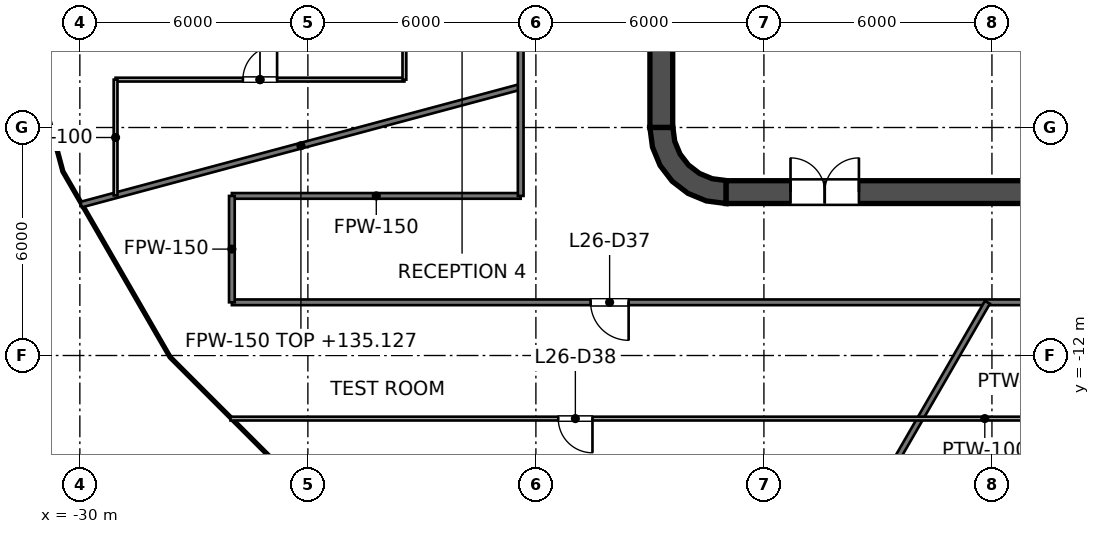
"""IFC4 building model, lengths in metres.
Left out: names, types, materials, properties, quantities, classifications, styles, units other than length and angle.
Written with IfcOpenShell. Run it as: python <this file> out.ifc"""

import sys

from ifc_helpers import new_model, si_unit, direction, frame, frame_2d, origin, place, context, subcontext, project, spatial, polyline, rectangle, outline, extrude, element, fill, save


model = new_model("IFC4")
c1 = context("Model", 3, precision=1e-05, world=origin(), true_north=direction((0.0, 1.0)))
c2 = subcontext(c1, "Body", "Model", "MODEL_VIEW")
j1 = project(units=[si_unit("LENGTHUNIT", "METRE"), si_unit("PLANEANGLEUNIT", "RADIAN")], contexts=[c1])
p1 = place(None, origin())
s1 = spatial("IfcSite", under=j1, at=p1, CompositionType="ELEMENT")
p2 = place(p1, origin())
s2 = spatial("IfcBuilding", under=s1, at=p2, CompositionType="ELEMENT")
p3 = place(p2, frame((0.0, 0.0, 131.4)))
s3 = spatial("IfcBuildingStorey", under=s2, at=p3, CompositionType="ELEMENT", Elevation=131.4)
p4 = place(p3, frame((-13.0, -7.7, 0.0), z_axis=(0.0, 0.0, 1.0), x_axis=(1.0, 0.0, 0.0)))
e1 = element("IfcWall", 1, at=p4, inside=s3, PredefinedType="SHEAR", context=c2, shape_type="SweptSolid", body=[
    extrude(rectangle(XDim=26.0, YDim=0.6, at=frame_2d((13.0, 0.0))), origin(), (0.0, 0.0, 1.0), 4.2),
])
p5 = place(p4, frame((1.7, 0.0, 0.0)))
e2 = element("IfcOpeningElement", 2, at=p5, cuts=e1, PredefinedType="OPENING", context=c2, shape_type="SweptSolid", body=[
    extrude(rectangle(XDim=1.8, YDim=2.1, at=frame_2d((0.9, 1.05))), frame((0.0, 0.3, 0.0), z_axis=(0.0, -1.0, 0.0), x_axis=(1.0, 0.0, 0.0)), (0.0, 0.0, 1.0), 0.6),
])
p6 = place(p4, frame((22.5, 0.0, 0.0)))
e3 = element("IfcOpeningElement", 3, at=p6, cuts=e1, PredefinedType="OPENING", context=c2, shape_type="SweptSolid", body=[
    extrude(rectangle(XDim=1.8, YDim=2.1, at=frame_2d((0.9, 1.05))), frame((0.0, 0.3, 0.0), z_axis=(0.0, -1.0, 0.0), x_axis=(1.0, 0.0, 0.0)), (0.0, 0.0, 1.0), 0.6),
])
p7 = place(p3, frame((-14.7, -6.0, 0.0), z_axis=(0.0, 0.0, 1.0), x_axis=(0.0, 1.0, 0.0)))
e4 = element("IfcWall", 4, at=p7, inside=s3, PredefinedType="SHEAR", context=c2, shape_type="SweptSolid", body=[
    extrude(rectangle(XDim=12.0, YDim=0.6, at=frame_2d((6.0, 0.0))), origin(), (0.0, 0.0, 1.0), 4.2),
])
p8 = place(p3, origin())
e5 = element("IfcWall", 5, at=p8, inside=s3, PredefinedType="SHEAR", context=c2, shape_type="SweptSolid", body=[
    extrude(outline(polyline([(-13.0, -8.0), (-13.0, -7.395), (-13.361, -7.347), (-13.698, -7.208), (-13.986, -6.986), (-14.208, -6.698), (-14.347, -6.361), (-14.395, -6.0), (-15.0, -6.0), (-14.932, -6.518), (-14.732, -7.0), (-14.414, -7.414), (-14.0, -7.732), (-13.518, -7.932), (-13.0, -8.0)])), origin(), (0.0, 0.0, 1.0), 4.2),
])
p9 = place(p3, frame((-9.0, -6.6, 0.0), z_axis=(0.0, 0.0, 1.0), x_axis=(0.0, 1.0, 0.0)))
e6 = element("IfcWall", 6, at=p9, inside=s3, PredefinedType="PARTITIONING", context=c2, shape_type="SweptSolid", body=[
    extrude(rectangle(XDim=2.5, YDim=0.25, at=frame_2d((1.25, 0.0))), origin(), (0.0, 0.0, 1.0), 4.05),
])
p10 = place(p9, frame((0.75, 0.0, 0.0)))
e7 = element("IfcOpeningElement", 7, at=p10, cuts=e6, PredefinedType="OPENING", context=c2, shape_type="SweptSolid", body=[
    extrude(rectangle(XDim=1.0, YDim=2.1, at=frame_2d((0.5, 1.05))), frame((0.0, 0.125, 0.0), z_axis=(0.0, -1.0, 0.0), x_axis=(1.0, 0.0, 0.0)), (0.0, 0.0, 1.0), 0.25),
])
p11 = place(p3, frame((-9.125, -7.0, 0.0), z_axis=(0.0, 0.0, 1.0), x_axis=(1.0, 0.0, 0.0)))
e8 = element("IfcWall", 8, at=p11, inside=s3, PredefinedType="SOLIDWALL", context=c2, shape_type="SweptSolid", body=[
    extrude(rectangle(XDim=18.25, YDim=0.8, at=frame_2d((9.125, 0.0))), origin(), (0.0, 0.0, 1.0), 4.05),
])
p12 = place(p3, frame((-9.125, -3.975, 0.0), z_axis=(0.0, 0.0, 1.0), x_axis=(1.0, 0.0, 0.0)))
e9 = element("IfcWall", 9, at=p12, inside=s3, PredefinedType="SOLIDWALL", context=c2, shape_type="SweptSolid", body=[
    extrude(rectangle(XDim=12.4, YDim=0.25, at=frame_2d((6.2, 0.0))), origin(), (0.0, 0.0, 1.0), 4.05),
])
p13 = place(p12, frame((1.05, 0.0, 0.0)))
e10 = element("IfcOpeningElement", 10, at=p13, cuts=e9, PredefinedType="OPENING", context=c2, shape_type="SweptSolid", body=[
    extrude(rectangle(XDim=1.2, YDim=2.1, at=frame_2d((0.6, 1.05))), frame((0.0, 0.125, 0.0), z_axis=(0.0, -1.0, 0.0), x_axis=(1.0, 0.0, 0.0)), (0.0, 0.0, 1.0), 0.25),
])
p14 = place(p12, frame((4.1, 0.0, 0.0)))
e11 = element("IfcOpeningElement", 11, at=p14, cuts=e9, PredefinedType="OPENING", context=c2, shape_type="SweptSolid", body=[
    extrude(rectangle(XDim=1.2, YDim=2.1, at=frame_2d((0.6, 1.05))), frame((0.0, 0.125, 0.0), z_axis=(0.0, -1.0, 0.0), x_axis=(1.0, 0.0, 0.0)), (0.0, 0.0, 1.0), 0.25),
])
p15 = place(p3, frame((-11.8, -7.4, 0.0), z_axis=(0.0, 0.0, 1.0), x_axis=(0.0, 1.0, 0.0)))
e12 = element("IfcWall", 12, at=p15, inside=s3, PredefinedType="SOLIDWALL", context=c2, shape_type="SweptSolid", body=[
    extrude(rectangle(XDim=14.8, YDim=0.4, at=frame_2d((7.4, 0.0))), origin(), (0.0, 0.0, 1.0), 4.05),
])
p16 = place(p15, frame((11.2, 0.0, 0.0)))
e13 = element("IfcOpeningElement", 13, at=p16, cuts=e12, PredefinedType="OPENING", context=c2, shape_type="SweptSolid", body=[
    extrude(rectangle(XDim=1.1, YDim=2.1, at=frame_2d((0.55, 1.05))), frame((0.0, 0.2, 0.0), z_axis=(0.0, -1.0, 0.0), x_axis=(1.0, 0.0, 0.0)), (0.0, 0.0, 1.0), 0.4),
])
p17 = place(p15, frame((8.3, 0.0, 0.0)))
e14 = element("IfcOpeningElement", 14, at=p17, cuts=e12, PredefinedType="OPENING", context=c2, shape_type="SweptSolid", body=[
    extrude(rectangle(XDim=1.1, YDim=2.1, at=frame_2d((0.55, 1.05))), frame((0.0, 0.2, 0.0), z_axis=(0.0, -1.0, 0.0), x_axis=(1.0, 0.0, 0.0)), (0.0, 0.0, 1.0), 0.4),
])
p18 = place(p15, frame((5.4, 0.0, 0.0)))
e15 = element("IfcOpeningElement", 15, at=p18, cuts=e12, PredefinedType="OPENING", context=c2, shape_type="SweptSolid", body=[
    extrude(rectangle(XDim=1.1, YDim=2.1, at=frame_2d((0.55, 1.05))), frame((0.0, 0.2, 0.0), z_axis=(0.0, -1.0, 0.0), x_axis=(1.0, 0.0, 0.0)), (0.0, 0.0, 1.0), 0.4),
])
p19 = place(p15, frame((13.552, 0.0, 0.0)))
e16 = element("IfcOpeningElement", 16, at=p19, cuts=e12, PredefinedType="OPENING", context=c2, shape_type="SweptSolid", body=[
    extrude(rectangle(XDim=0.9, YDim=2.1, at=frame_2d((0.45, 1.05))), frame((0.0, 0.2, 0.0), z_axis=(0.0, -1.0, 0.0), x_axis=(1.0, 0.0, 0.0)), (0.0, 0.0, 1.0), 0.4),
])
p20 = place(p15, frame((0.347, 0.0, 0.0)))
e17 = element("IfcOpeningElement", 17, at=p20, cuts=e12, PredefinedType="OPENING", context=c2, shape_type="SweptSolid", body=[
    extrude(rectangle(XDim=0.9, YDim=2.1, at=frame_2d((0.45, 1.05))), frame((0.0, 0.2, 0.0), z_axis=(0.0, -1.0, 0.0), x_axis=(1.0, 0.0, 0.0)), (0.0, 0.0, 1.0), 0.4),
])
e18 = element("IfcWall", 18, at=p8, inside=s3, PredefinedType="SOLIDWALL", context=c2, shape_type="SweptSolid", body=[
    extrude(outline(polyline([(-12.0, -5.925), (-12.0, -5.675), (-14.15, -5.675), (-14.15, -3.025), (-12.0, -3.025), (-12.0, -2.775), (-14.15, -2.775), (-14.15, -0.125), (-12.0, -0.125), (-12.0, 0.125), (-14.15, 0.125), (-14.15, 2.775), (-12.0, 2.775), (-12.0, 3.025), (-14.15, 3.025), (-14.15, 5.675), (-12.0, 5.675), (-12.0, 5.925), (-14.15, 5.925), (-14.4, 5.925), (-14.4, 5.675), (-14.4, 3.025), (-14.4, 2.775), (-14.4, 0.125), (-14.4, -0.125), (-14.4, -2.775), (-14.4, -3.025), (-14.4, -5.675), (-14.4, -5.925), (-14.15, -5.925), (-12.0, -5.925)])), origin(), (0.0, 0.0, 1.0), 4.05),
])
p21 = place(p3, frame((-26.0, -10.6, 0.0), z_axis=(0.0, 0.0, 1.0), x_axis=(1.0, 0.0, 0.0)))
e19 = element("IfcWall", 19, at=p21, inside=s3, PredefinedType="PARTITIONING", context=c2, shape_type="SweptSolid", body=[
    extrude(rectangle(XDim=52.0, YDim=0.15, at=frame_2d((26.0, 0.0))), origin(), (0.0, 0.0, 1.0), 3.127),
])
p22 = place(p21, frame((22.49, 0.0, 0.0)))
e20 = element("IfcOpeningElement", 20, at=p22, cuts=e19, PredefinedType="OPENING", context=c2, shape_type="SweptSolid", body=[
    extrude(rectangle(XDim=1.0, YDim=2.1, at=frame_2d((0.5, 1.05))), frame((0.0, 0.075, 0.0), z_axis=(0.0, -1.0, 0.0), x_axis=(1.0, 0.0, 0.0)), (0.0, 0.0, 1.0), 0.15),
])
p23 = place(p21, frame((30.8, 0.0, 0.0)))
e21 = element("IfcOpeningElement", 21, at=p23, cuts=e19, PredefinedType="OPENING", context=c2, shape_type="SweptSolid", body=[
    extrude(rectangle(XDim=1.0, YDim=2.1, at=frame_2d((0.5, 1.05))), frame((0.0, 0.075, 0.0), z_axis=(0.0, -1.0, 0.0), x_axis=(1.0, 0.0, 0.0)), (0.0, 0.0, 1.0), 0.15),
])
p24 = place(p21, frame((43.75, 0.0, 0.0)))
e22 = element("IfcOpeningElement", 22, at=p24, cuts=e19, PredefinedType="OPENING", context=c2, shape_type="SweptSolid", body=[
    extrude(rectangle(XDim=1.2, YDim=2.1, at=frame_2d((0.6, 1.05))), frame((0.0, 0.075, 0.0), z_axis=(0.0, -1.0, 0.0), x_axis=(1.0, 0.0, 0.0)), (0.0, 0.0, 1.0), 0.15),
])
p25 = place(p21, frame((9.44, 0.0, 0.0)))
e23 = element("IfcOpeningElement", 23, at=p25, cuts=e19, PredefinedType="OPENING", context=c2, shape_type="SweptSolid", body=[
    extrude(rectangle(XDim=1.0, YDim=2.1, at=frame_2d((0.5, 1.05))), frame((0.0, 0.075, 0.0), z_axis=(0.0, -1.0, 0.0), x_axis=(1.0, 0.0, 0.0)), (0.0, 0.0, 1.0), 0.15),
])
p26 = place(p3, frame((-26.0, -7.8, 0.0), z_axis=(0.0, 0.0, 1.0), x_axis=(1.0, 0.0, 0.0)))
e24 = element("IfcWall", 24, at=p26, inside=s3, PredefinedType="PARTITIONING", context=c2, shape_type="SweptSolid", body=[
    extrude(rectangle(XDim=7.6, YDim=0.15, at=frame_2d((3.8, 0.0))), origin(), (0.0, 0.0, 1.0), 3.276),
])
p27 = place(p3, frame((-29.966, -8.029, 0.0), z_axis=(0.0, 0.0, 1.0), x_axis=(0.965898076595, 0.258922586171, 0.0)))
e25 = element("IfcWall", 25, at=p27, inside=s3, PredefinedType="PARTITIONING", context=c2, shape_type="SweptSolid", body=[
    extrude(rectangle(XDim=11.974, YDim=0.15, at=frame_2d((5.987, 0.0))), origin(), (0.0, 0.0, 1.0), 3.727),
])
p28 = place(p3, frame((-12.65, -21.91, 0.0), z_axis=(0.0, 0.0, 1.0), x_axis=(0.500017508733, 0.866015294877, 0.0)))
e26 = element("IfcWall", 26, at=p28, inside=s3, PredefinedType="PARTITIONING", context=c2, shape_type="SweptSolid", body=[
    extrude(rectangle(XDim=13.06, YDim=0.15, at=frame_2d((6.53, 0.0))), origin(), (0.0, 0.0, 1.0), 3.502),
])
p29 = place(p3, frame((-18.4, -7.8, 0.0), z_axis=(0.0, 0.0, 1.0), x_axis=(0.0, 1.0, 0.0)))
e27 = element("IfcWall", 27, at=p29, inside=s3, PredefinedType="PARTITIONING", context=c2, shape_type="SweptSolid", body=[
    extrude(rectangle(XDim=15.6, YDim=0.15, at=frame_2d((7.8, 0.0))), origin(), (0.0, 0.0, 1.0), 3.127),
])
p30 = place(p29, frame((5.474, 0.0, 0.0)))
e28 = element("IfcOpeningElement", 28, at=p30, cuts=e27, PredefinedType="OPENING", context=c2, shape_type="SweptSolid", body=[
    extrude(rectangle(XDim=1.0, YDim=2.1, at=frame_2d((0.5, 1.05))), frame((0.0, 0.075, 0.0), z_axis=(0.0, -1.0, 0.0), x_axis=(1.0, 0.0, 0.0)), (0.0, 0.0, 1.0), 0.15),
])
p31 = place(p3, frame((-26.0, -10.6, 0.0), z_axis=(0.0, 0.0, 1.0), x_axis=(0.0, 1.0, 0.0)))
e29 = element("IfcWall", 29, at=p31, inside=s3, PredefinedType="PARTITIONING", context=c2, shape_type="SweptSolid", body=[
    extrude(rectangle(XDim=2.8, YDim=0.15, at=frame_2d((1.4, 0.0))), origin(), (0.0, 0.0, 1.0), 3.276),
])
p32 = place(p3, frame((-26.036, -13.66, 0.0), z_axis=(0.0, 0.0, 1.0), x_axis=(1.0, 0.0, 0.0)))
e30 = element("IfcWall", 30, at=p32, inside=s3, PredefinedType="PARTITIONING", context=c2, shape_type="SweptSolid", body=[
    extrude(rectangle(XDim=39.696, YDim=0.1, at=frame_2d((19.848, 0.0))), origin(), (0.0, 0.0, 1.0), 3.127),
])
p33 = place(p32, frame((31.966, 0.0, 0.0)))
e31 = element("IfcOpeningElement", 31, at=p33, cuts=e30, PredefinedType="OPENING", context=c2, shape_type="SweptSolid", body=[
    extrude(rectangle(XDim=1.8, YDim=2.1, at=frame_2d((0.9, 1.05))), frame((0.0, 0.05, 0.0), z_axis=(0.0, -1.0, 0.0), x_axis=(1.0, 0.0, 0.0)), (0.0, 0.0, 1.0), 0.1),
])
p34 = place(p32, frame((8.625, 0.0, 0.0)))
e32 = element("IfcOpeningElement", 32, at=p34, cuts=e30, PredefinedType="OPENING", context=c2, shape_type="SweptSolid", body=[
    extrude(rectangle(XDim=0.9, YDim=2.1, at=frame_2d((0.45, 1.05))), frame((0.0, 0.05, 0.0), z_axis=(0.0, -1.0, 0.0), x_axis=(1.0, 0.0, 0.0)), (0.0, 0.0, 1.0), 0.1),
])
p35 = place(p3, frame((-29.06, -4.74, 0.0), z_axis=(0.0, 0.0, 1.0), x_axis=(1.0, 0.0, 0.0)))
e33 = element("IfcWall", 33, at=p35, inside=s3, PredefinedType="PARTITIONING", context=c2, shape_type="SweptSolid", body=[
    extrude(rectangle(XDim=7.6, YDim=0.1, at=frame_2d((3.8, 0.0))), origin(), (0.0, 0.0, 1.0), 4.05),
])
p36 = place(p35, frame((3.35, 0.0, 0.0)))
e34 = element("IfcOpeningElement", 34, at=p36, cuts=e33, PredefinedType="OPENING", context=c2, shape_type="SweptSolid", body=[
    extrude(rectangle(XDim=0.9, YDim=2.1, at=frame_2d((0.45, 1.05))), frame((0.0, 0.05, 0.0), z_axis=(0.0, -1.0, 0.0), x_axis=(1.0, 0.0, 0.0)), (0.0, 0.0, 1.0), 0.1),
])
p37 = place(p3, frame((-21.46, -4.74, 0.0), z_axis=(0.0, 0.0, 1.0), x_axis=(0.0, 1.0, 0.0)))
e35 = element("IfcWall", 35, at=p37, inside=s3, PredefinedType="PARTITIONING", context=c2, shape_type="SweptSolid", body=[
    extrude(rectangle(XDim=9.48, YDim=0.1, at=frame_2d((4.74, 0.0))), origin(), (0.0, 0.0, 1.0), 3.127),
])
p38 = place(p3, frame((-29.06, -7.786, 0.0), z_axis=(0.0, 0.0, 1.0), x_axis=(0.0, 1.0, 0.0)))
e36 = element("IfcWall", 36, at=p38, inside=s3, PredefinedType="PARTITIONING", context=c2, shape_type="SweptSolid", body=[
    extrude(rectangle(XDim=3.046, YDim=0.1, at=frame_2d((1.523, 0.0))), origin(), (0.0, 0.0, 1.0), 3.127),
])
p39 = place(p10, origin())
e37 = element("IfcDoor", 37, at=p39, inside=s3, OperationType="SINGLE_SWING_LEFT", PredefinedType="DOOR", context=c2, shape_type="SweptSolid", body=[
    extrude(rectangle(XDim=1.0, YDim=2.1, at=frame_2d((0.5, 1.05))), frame((0.0, 0.025, 0.0), z_axis=(0.0, -1.0, 0.0), x_axis=(1.0, 0.0, 0.0)), (0.0, 0.0, 1.0), 0.05),
])
fill(e7, e37)
p40 = place(p20, origin())
e38 = element("IfcDoor", 38, at=p40, inside=s3, OperationType="SINGLE_SWING_LEFT", PredefinedType="DOOR", context=c2, shape_type="SweptSolid", body=[
    extrude(rectangle(XDim=0.9, YDim=2.1, at=frame_2d((0.45, 1.05))), frame((0.0, 0.025, 0.0), z_axis=(0.0, -1.0, 0.0), x_axis=(1.0, 0.0, 0.0)), (0.0, 0.0, 1.0), 0.05),
])
fill(e17, e38)
p41 = place(p5, origin())
e39 = element("IfcDoor", 39, at=p41, inside=s3, OperationType="DOUBLE_DOOR_SINGLE_SWING", PredefinedType="DOOR", context=c2, shape_type="SweptSolid", body=[
    extrude(rectangle(XDim=1.8, YDim=2.1, at=frame_2d((0.9, 1.05))), frame((0.0, 0.025, 0.0), z_axis=(0.0, -1.0, 0.0), x_axis=(1.0, 0.0, 0.0)), (0.0, 0.0, 1.0), 0.05),
])
fill(e2, e39)
p42 = place(p36, origin())
e40 = element("IfcDoor", 40, at=p42, inside=s3, OperationType="SINGLE_SWING_RIGHT", PredefinedType="DOOR", context=c2, shape_type="SweptSolid", body=[
    extrude(rectangle(XDim=0.9, YDim=2.1, at=frame_2d((0.45, 1.05))), frame((0.0, 0.025, 0.0), z_axis=(0.0, -1.0, 0.0), x_axis=(1.0, 0.0, 0.0)), (0.0, 0.0, 1.0), 0.05),
])
fill(e34, e40)
p43 = place(p25, origin())
e41 = element("IfcDoor", 41, at=p43, inside=s3, OperationType="SINGLE_SWING_RIGHT", PredefinedType="DOOR", context=c2, shape_type="SweptSolid", body=[
    extrude(rectangle(XDim=1.0, YDim=2.1, at=frame_2d((0.5, 1.05))), frame((0.0, 0.025, 0.0), z_axis=(0.0, -1.0, 0.0), x_axis=(1.0, 0.0, 0.0)), (0.0, 0.0, 1.0), 0.05),
])
fill(e23, e41)
p44 = place(p34, origin())
e42 = element("IfcDoor", 42, at=p44, inside=s3, OperationType="SINGLE_SWING_RIGHT", PredefinedType="DOOR", context=c2, shape_type="SweptSolid", body=[
    extrude(rectangle(XDim=0.9, YDim=2.1, at=frame_2d((0.45, 1.05))), frame((0.0, 0.025, 0.0), z_axis=(0.0, -1.0, 0.0), x_axis=(1.0, 0.0, 0.0)), (0.0, 0.0, 1.0), 0.05),
])
fill(e32, e42)
save(model, sys.argv[1])
